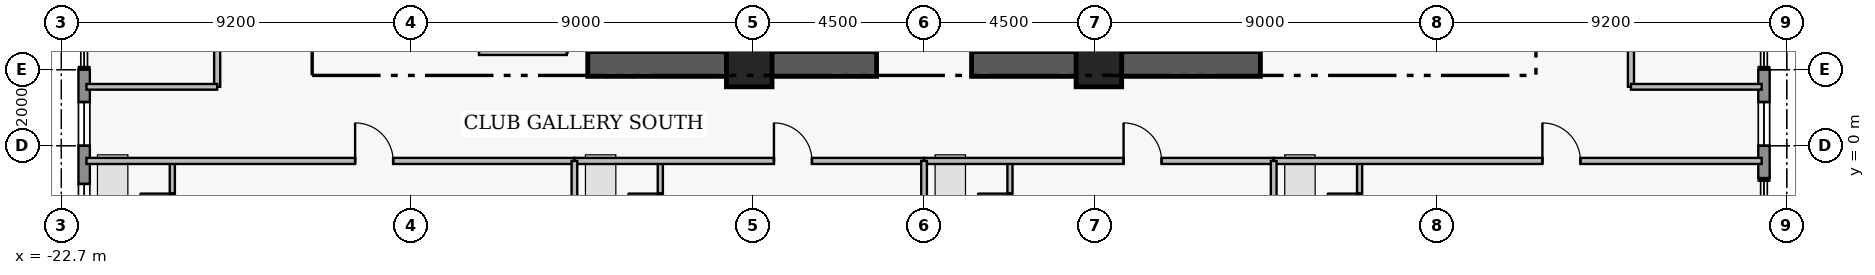
"""IFC4 building model, lengths in metres.
Left out: names, types, materials, properties, quantities, classifications, styles, units other than length and angle.
Written with IfcOpenShell. Run it as: python <this file> out.ifc"""

import sys

from ifc_helpers import new_model, si_unit, direction, frame, frame_2d, origin, origin_2d, place, context, subcontext, project, spatial, rectangle, extrude, element, fill, save


model = new_model("IFC4")
c1 = context("Model", 3, precision=1e-05, world=origin(), true_north=direction((0.0, 1.0)))
c2 = subcontext(c1, "Body", "Model", "MODEL_VIEW")
j1 = project(units=[si_unit("LENGTHUNIT", "METRE"), si_unit("PLANEANGLEUNIT", "RADIAN")], contexts=[c1])
p1 = place(None, origin())
s1 = spatial("IfcSite", under=j1, at=p1, CompositionType="ELEMENT")
p2 = place(p1, origin())
s2 = spatial("IfcBuilding", under=s1, at=p2, CompositionType="ELEMENT")
p3 = place(p2, frame((0.0, 0.0, 226.15)))
s3 = spatial("IfcBuildingStorey", under=s2, at=p3, CompositionType="ELEMENT", Elevation=226.15)
for number, where, z_axis, x_axis in (
    (1, (-8.85, 2.15, 0.0), (0.0, 0.0, 1.0), (1.0, 0.0, 0.0)),
    (2, (1.25, 2.15, 0.0), (0.0, 0.0, 1.0), (1.0, 0.0, 0.0)),
):
    element("IfcWall", number, at=place(p3, frame(where, z_axis=z_axis, x_axis=x_axis)), inside=s3, PredefinedType="SHEAR", context=c2, shape_type="SweptSolid", body=[
        extrude(rectangle(XDim=7.6, YDim=0.65, at=frame_2d((3.8, 0.0))), origin(), (0.0, 0.0, 1.0), 3.53),
    ])
for number, where, z_axis, x_axis in (
    (3, (-4.6, 2.15, 0.0), (0.0, 0.0, 1.0), (1.0, 0.0, 0.0)),
    (4, (4.6, 2.15, 0.0), (0.0, 0.0, 1.0), (1.0, 0.0, 0.0)),
):
    element("IfcColumn", number, at=place(p3, frame(where, z_axis=z_axis, x_axis=x_axis)), inside=s3, PredefinedType="COLUMN", context=c2, shape_type="SweptSolid", body=[
        extrude(rectangle(XDim=1.2, YDim=1.2, at=origin_2d()), origin(), (0.0, 0.0, 1.0), 3.75),
    ])
p4 = place(p3, frame((-22.1, -4.2, 0.0), z_axis=(0.0, 0.0, 1.0), x_axis=(0.0, 1.0, 0.0)))
e5 = element("IfcWall", 5, at=p4, inside=s3, PredefinedType="STANDARD", context=c2, shape_type="SweptSolid", body=[
    extrude(rectangle(XDim=6.2, YDim=0.3, at=frame_2d((3.1, 0.0))), origin(), (0.0, 0.0, 1.0), 3.53),
])
p5 = place(p4, frame((2.045, 0.0, 0.95)))
e6 = element("IfcOpeningElement", 6, at=p5, cuts=e5, PredefinedType="OPENING", context=c2, shape_type="SweptSolid", body=[
    extrude(rectangle(XDim=1.15, YDim=1.55, at=frame_2d((0.575, 0.775))), frame((0.0, 0.16, 0.0), z_axis=(0.0, -1.0, 0.0), x_axis=(1.0, 0.0, 0.0)), (0.0, 0.0, 1.0), 0.32),
])
p6 = place(p4, frame((4.2, 0.0, 0.95)))
e7 = element("IfcOpeningElement", 7, at=p6, cuts=e5, PredefinedType="OPENING", context=c2, shape_type="SweptSolid", body=[
    extrude(rectangle(XDim=1.15, YDim=1.55, at=frame_2d((0.575, 0.775))), frame((0.0, 0.16, 0.0), z_axis=(0.0, -1.0, 0.0), x_axis=(1.0, 0.0, 0.0)), (0.0, 0.0, 1.0), 0.32),
])
p7 = place(p3, frame((22.1, 2.0, 0.0), z_axis=(0.0, 0.0, 1.0), x_axis=(0.0, -1.0, 0.0)))
e8 = element("IfcWall", 8, at=p7, inside=s3, PredefinedType="STANDARD", context=c2, shape_type="SweptSolid", body=[
    extrude(rectangle(XDim=2.85, YDim=0.3, at=frame_2d((1.425, 0.0))), origin(), (0.0, 0.0, 1.0), 3.53),
])
p8 = place(p7, frame((0.85, 0.0, 0.95)))
e9 = element("IfcOpeningElement", 9, at=p8, cuts=e8, PredefinedType="OPENING", context=c2, shape_type="SweptSolid", body=[
    extrude(rectangle(XDim=1.15, YDim=1.55, at=frame_2d((0.575, 0.775))), frame((0.0, 0.16, 0.0), z_axis=(0.0, -1.0, 0.0), x_axis=(1.0, 0.0, 0.0)), (0.0, 0.0, 1.0), 0.32),
])
p9 = place(p3, frame((-19.78, -2.76, 0.0), z_axis=(0.0, 0.0, 1.0), x_axis=(0.0, 1.0, 0.0)))
e10 = element("IfcWall", 10, at=p9, inside=s3, PredefinedType="PLUMBINGWALL", context=c2, shape_type="SweptSolid", body=[
    extrude(rectangle(XDim=2.36, YDim=0.135, at=frame_2d((1.18, 0.0))), origin(), (0.0, 0.0, 1.0), 3.53),
])
p10 = place(p9, frame((0.65, 0.0, 0.0)))
e11 = element("IfcOpeningElement", 11, at=p10, cuts=e10, PredefinedType="OPENING", context=c2, shape_type="SweptSolid", body=[
    extrude(rectangle(XDim=0.85, YDim=2.1, at=frame_2d((0.425, 1.05))), frame((0.0, 0.077, 0.0), z_axis=(0.0, -1.0, 0.0), x_axis=(1.0, 0.0, 0.0)), (0.0, 0.0, 1.0), 0.155),
])
p11 = place(p3, frame((-22.04, -0.4, 0.0), z_axis=(0.0, 0.0, 1.0), x_axis=(1.0, 0.0, 0.0)))
e12 = element("IfcWall", 12, at=p11, inside=s3, PredefinedType="PARTITIONING", context=c2, shape_type="SweptSolid", body=[
    extrude(rectangle(XDim=12.84, YDim=0.16, at=frame_2d((6.42, 0.0))), origin(), (0.0, 0.0, 1.0), 3.53),
])
p12 = place(p11, frame((7.07, 0.0, 0.0)))
e13 = element("IfcOpeningElement", 13, at=p12, cuts=e12, PredefinedType="OPENING", context=c2, shape_type="SweptSolid", body=[
    extrude(rectangle(XDim=1.0, YDim=2.15, at=frame_2d((0.5, 1.075))), frame((0.0, 0.09, 0.0), z_axis=(0.0, -1.0, 0.0), x_axis=(1.0, 0.0, 0.0)), (0.0, 0.0, 1.0), 0.18),
])
p13 = place(p3, frame((-6.94, -2.76, 0.0), z_axis=(0.0, 0.0, 1.0), x_axis=(0.0, 1.0, 0.0)))
e14 = element("IfcWall", 14, at=p13, inside=s3, PredefinedType="PLUMBINGWALL", context=c2, shape_type="SweptSolid", body=[
    extrude(rectangle(XDim=2.36, YDim=0.135, at=frame_2d((1.18, 0.0))), origin(), (0.0, 0.0, 1.0), 3.53),
])
p14 = place(p13, frame((0.65, 0.0, 0.0)))
e15 = element("IfcOpeningElement", 15, at=p14, cuts=e14, PredefinedType="OPENING", context=c2, shape_type="SweptSolid", body=[
    extrude(rectangle(XDim=0.85, YDim=2.1, at=frame_2d((0.425, 1.05))), frame((0.0, 0.077, 0.0), z_axis=(0.0, -1.0, 0.0), x_axis=(1.0, 0.0, 0.0)), (0.0, 0.0, 1.0), 0.155),
])
p15 = place(p3, frame((-9.2, -0.4, 0.0), z_axis=(0.0, 0.0, 1.0), x_axis=(1.0, 0.0, 0.0)))
e16 = element("IfcWall", 16, at=p15, inside=s3, PredefinedType="PARTITIONING", context=c2, shape_type="SweptSolid", body=[
    extrude(rectangle(XDim=9.2, YDim=0.16, at=frame_2d((4.6, 0.0))), origin(), (0.0, 0.0, 1.0), 3.53),
])
p16 = place(p15, frame((5.25, 0.0, 0.0)))
e17 = element("IfcOpeningElement", 17, at=p16, cuts=e16, PredefinedType="OPENING", context=c2, shape_type="SweptSolid", body=[
    extrude(rectangle(XDim=1.0, YDim=2.15, at=frame_2d((0.5, 1.075))), frame((0.0, 0.09, 0.0), z_axis=(0.0, -1.0, 0.0), x_axis=(1.0, 0.0, 0.0)), (0.0, 0.0, 1.0), 0.18),
])
p17 = place(p3, frame((2.26, -2.76, 0.0), z_axis=(0.0, 0.0, 1.0), x_axis=(0.0, 1.0, 0.0)))
e18 = element("IfcWall", 18, at=p17, inside=s3, PredefinedType="PLUMBINGWALL", context=c2, shape_type="SweptSolid", body=[
    extrude(rectangle(XDim=2.36, YDim=0.135, at=frame_2d((1.18, 0.0))), origin(), (0.0, 0.0, 1.0), 3.53),
])
p18 = place(p17, frame((0.65, 0.0, 0.0)))
e19 = element("IfcOpeningElement", 19, at=p18, cuts=e18, PredefinedType="OPENING", context=c2, shape_type="SweptSolid", body=[
    extrude(rectangle(XDim=0.85, YDim=2.1, at=frame_2d((0.425, 1.05))), frame((0.0, 0.077, 0.0), z_axis=(0.0, -1.0, 0.0), x_axis=(1.0, 0.0, 0.0)), (0.0, 0.0, 1.0), 0.155),
])
p19 = place(p3, frame((0.0, -0.4, 0.0), z_axis=(0.0, 0.0, 1.0), x_axis=(1.0, 0.0, 0.0)))
e20 = element("IfcWall", 20, at=p19, inside=s3, PredefinedType="PARTITIONING", context=c2, shape_type="SweptSolid", body=[
    extrude(rectangle(XDim=9.2, YDim=0.16, at=frame_2d((4.6, 0.0))), origin(), (0.0, 0.0, 1.0), 3.53),
])
p20 = place(p19, frame((5.25, 0.0, 0.0)))
e21 = element("IfcOpeningElement", 21, at=p20, cuts=e20, PredefinedType="OPENING", context=c2, shape_type="SweptSolid", body=[
    extrude(rectangle(XDim=1.0, YDim=2.15, at=frame_2d((0.5, 1.075))), frame((0.0, 0.09, 0.0), z_axis=(0.0, -1.0, 0.0), x_axis=(1.0, 0.0, 0.0)), (0.0, 0.0, 1.0), 0.18),
])
p21 = place(p3, frame((11.46, -2.76, 0.0), z_axis=(0.0, 0.0, 1.0), x_axis=(0.0, 1.0, 0.0)))
e22 = element("IfcWall", 22, at=p21, inside=s3, PredefinedType="PLUMBINGWALL", context=c2, shape_type="SweptSolid", body=[
    extrude(rectangle(XDim=2.36, YDim=0.135, at=frame_2d((1.18, 0.0))), origin(), (0.0, 0.0, 1.0), 3.53),
])
p22 = place(p21, frame((0.65, 0.0, 0.0)))
e23 = element("IfcOpeningElement", 23, at=p22, cuts=e22, PredefinedType="OPENING", context=c2, shape_type="SweptSolid", body=[
    extrude(rectangle(XDim=0.85, YDim=2.1, at=frame_2d((0.425, 1.05))), frame((0.0, 0.077, 0.0), z_axis=(0.0, -1.0, 0.0), x_axis=(1.0, 0.0, 0.0)), (0.0, 0.0, 1.0), 0.155),
])
p23 = place(p3, frame((9.2, -0.4, 0.0), z_axis=(0.0, 0.0, 1.0), x_axis=(1.0, 0.0, 0.0)))
e24 = element("IfcWall", 24, at=p23, inside=s3, PredefinedType="PARTITIONING", context=c2, shape_type="SweptSolid", body=[
    extrude(rectangle(XDim=12.84, YDim=0.16, at=frame_2d((6.42, 0.0))), origin(), (0.0, 0.0, 1.0), 3.53),
])
p24 = place(p23, frame((7.07, 0.0, 0.0)))
e25 = element("IfcOpeningElement", 25, at=p24, cuts=e24, PredefinedType="OPENING", context=c2, shape_type="SweptSolid", body=[
    extrude(rectangle(XDim=1.0, YDim=2.15, at=frame_2d((0.5, 1.075))), frame((0.0, 0.09, 0.0), z_axis=(0.0, -1.0, 0.0), x_axis=(1.0, 0.0, 0.0)), (0.0, 0.0, 1.0), 0.18),
])
p25 = place(p3, frame((18.6, 1.55, 0.0), z_axis=(0.0, 0.0, 1.0), x_axis=(0.0, 1.0, 0.0)))
e26 = element("IfcWall", 26, at=p25, inside=s3, PredefinedType="PARTITIONING", context=c2, shape_type="SweptSolid", body=[
    extrude(rectangle(XDim=6.25, YDim=0.16, at=frame_2d((3.125, 0.0))), origin(), (0.0, 0.0, 1.0), 3.53),
])
p26 = place(p25, frame((2.665, 0.0, 0.0)))
e27 = element("IfcOpeningElement", 27, at=p26, cuts=e26, PredefinedType="OPENING", context=c2, shape_type="SweptSolid", body=[
    extrude(rectangle(XDim=0.92, YDim=2.12, at=frame_2d((0.46, 1.06))), frame((0.0, 0.09, 0.0), z_axis=(0.0, -1.0, 0.0), x_axis=(1.0, 0.0, 0.0)), (0.0, 0.0, 1.0), 0.18),
])
p27 = place(p3, frame((-18.6, 1.55, 0.0), z_axis=(0.0, 0.0, 1.0), x_axis=(0.0, 1.0, 0.0)))
e28 = element("IfcWall", 28, at=p27, inside=s3, PredefinedType="PARTITIONING", context=c2, shape_type="SweptSolid", body=[
    extrude(rectangle(XDim=5.2, YDim=0.16, at=frame_2d((2.6, 0.0))), origin(), (0.0, 0.0, 1.0), 3.53),
])
p28 = place(p27, frame((2.125, 0.0, 0.0)))
e29 = element("IfcOpeningElement", 29, at=p28, cuts=e28, PredefinedType="OPENING", context=c2, shape_type="SweptSolid", body=[
    extrude(rectangle(XDim=0.95, YDim=2.15, at=frame_2d((0.475, 1.075))), frame((0.0, 0.09, 0.0), z_axis=(0.0, -1.0, 0.0), x_axis=(1.0, 0.0, 0.0)), (0.0, 0.0, 1.0), 0.18),
])
p29 = place(p3, frame((-11.71, 2.47, 0.0), z_axis=(0.0, 0.0, 1.0), x_axis=(1.0, 0.0, 0.0)))
e30 = element("IfcWall", 30, at=p29, inside=s3, PredefinedType="PARTITIONING", context=c2, shape_type="SweptSolid", body=[
    extrude(rectangle(XDim=2.31, YDim=0.165, at=frame_2d((1.155, 0.0))), origin(), (0.0, 0.0, 1.0), 2.43),
])
for number, where, z_axis, x_axis in (
    (31, (-9.2, -7.52, 0.0), (0.0, 0.0, 1.0), (0.0, 1.0, 0.0)),
    (32, (0.0, -7.52, 0.0), (0.0, 0.0, 1.0), (0.0, 1.0, 0.0)),
    (33, (9.2, -7.52, 0.0), (0.0, 0.0, 1.0), (0.0, 1.0, 0.0)),
):
    element("IfcWall", number, at=place(p3, frame(where, z_axis=z_axis, x_axis=x_axis)), inside=s3, PredefinedType="PARTITIONING", context=c2, shape_type="SweptSolid", body=[
        extrude(rectangle(XDim=7.12, YDim=0.15, at=frame_2d((3.56, 0.0))), origin(), (0.0, 0.0, 1.0), 3.53),
    ])
for number, where, z_axis, x_axis in (
    (34, (18.6, 1.55, 0.0), (0.0, 0.0, 1.0), (1.0, 0.0, 0.0)),
    (35, (-22.04, 1.55, 0.0), (0.0, 0.0, 1.0), (1.0, 0.0, 0.0)),
):
    element("IfcWall", number, at=place(p3, frame(where, z_axis=z_axis, x_axis=x_axis)), inside=s3, PredefinedType="PARTITIONING", context=c2, shape_type="SweptSolid", body=[
        extrude(rectangle(XDim=3.44, YDim=0.15, at=frame_2d((1.72, 0.0))), origin(), (0.0, 0.0, 1.0), 3.53),
    ])
p30 = place(p5, origin())
e36 = element("IfcWindow", 36, at=p30, inside=s3, PartitioningType="SINGLE_PANEL", PredefinedType="WINDOW", context=c2, shape_type="SweptSolid", body=[
    extrude(rectangle(XDim=1.15, YDim=1.55, at=frame_2d((0.575, 0.775))), frame((0.0, 0.03, 0.0), z_axis=(0.0, -1.0, 0.0), x_axis=(1.0, 0.0, 0.0)), (0.0, 0.0, 1.0), 0.06),
])
fill(e6, e36)
p31 = place(p6, origin())
e37 = element("IfcWindow", 37, at=p31, inside=s3, PartitioningType="SINGLE_PANEL", PredefinedType="WINDOW", context=c2, shape_type="SweptSolid", body=[
    extrude(rectangle(XDim=1.15, YDim=1.55, at=frame_2d((0.575, 0.775))), frame((0.0, 0.03, 0.0), z_axis=(0.0, -1.0, 0.0), x_axis=(1.0, 0.0, 0.0)), (0.0, 0.0, 1.0), 0.06),
])
fill(e7, e37)
p32 = place(p8, origin())
e38 = element("IfcWindow", 38, at=p32, inside=s3, PartitioningType="SINGLE_PANEL", PredefinedType="WINDOW", context=c2, shape_type="SweptSolid", body=[
    extrude(rectangle(XDim=1.15, YDim=1.55, at=frame_2d((0.575, 0.775))), frame((0.0, 0.03, 0.0), z_axis=(0.0, -1.0, 0.0), x_axis=(1.0, 0.0, 0.0)), (0.0, 0.0, 1.0), 0.06),
])
fill(e9, e38)
p33 = place(p10, origin())
e39 = element("IfcDoor", 39, at=p33, inside=s3, OperationType="SINGLE_SWING_RIGHT", PredefinedType="DOOR", context=c2, shape_type="SweptSolid", body=[
    extrude(rectangle(XDim=0.85, YDim=2.1, at=frame_2d((0.425, 1.05))), frame((0.0, 0.025, 0.0), z_axis=(0.0, -1.0, 0.0), x_axis=(1.0, 0.0, 0.0)), (0.0, 0.0, 1.0), 0.05),
])
fill(e11, e39)
p34 = place(p12, origin())
e40 = element("IfcDoor", 40, at=p34, inside=s3, OperationType="SINGLE_SWING_LEFT", PredefinedType="DOOR", context=c2, shape_type="SweptSolid", body=[
    extrude(rectangle(XDim=1.0, YDim=2.15, at=frame_2d((0.5, 1.075))), frame((0.0, 0.025, 0.0), z_axis=(0.0, -1.0, 0.0), x_axis=(1.0, 0.0, 0.0)), (0.0, 0.0, 1.0), 0.05),
])
fill(e13, e40)
p35 = place(p14, origin())
e41 = element("IfcDoor", 41, at=p35, inside=s3, OperationType="SINGLE_SWING_RIGHT", PredefinedType="DOOR", context=c2, shape_type="SweptSolid", body=[
    extrude(rectangle(XDim=0.85, YDim=2.1, at=frame_2d((0.425, 1.05))), frame((0.0, 0.025, 0.0), z_axis=(0.0, -1.0, 0.0), x_axis=(1.0, 0.0, 0.0)), (0.0, 0.0, 1.0), 0.05),
])
fill(e15, e41)
p36 = place(p16, origin())
e42 = element("IfcDoor", 42, at=p36, inside=s3, OperationType="SINGLE_SWING_LEFT", PredefinedType="DOOR", context=c2, shape_type="SweptSolid", body=[
    extrude(rectangle(XDim=1.0, YDim=2.15, at=frame_2d((0.5, 1.075))), frame((0.0, 0.025, 0.0), z_axis=(0.0, -1.0, 0.0), x_axis=(1.0, 0.0, 0.0)), (0.0, 0.0, 1.0), 0.05),
])
fill(e17, e42)
p37 = place(p18, origin())
e43 = element("IfcDoor", 43, at=p37, inside=s3, OperationType="SINGLE_SWING_RIGHT", PredefinedType="DOOR", context=c2, shape_type="SweptSolid", body=[
    extrude(rectangle(XDim=0.85, YDim=2.1, at=frame_2d((0.425, 1.05))), frame((0.0, 0.025, 0.0), z_axis=(0.0, -1.0, 0.0), x_axis=(1.0, 0.0, 0.0)), (0.0, 0.0, 1.0), 0.05),
])
fill(e19, e43)
p38 = place(p20, origin())
e44 = element("IfcDoor", 44, at=p38, inside=s3, OperationType="SINGLE_SWING_LEFT", PredefinedType="DOOR", context=c2, shape_type="SweptSolid", body=[
    extrude(rectangle(XDim=1.0, YDim=2.15, at=frame_2d((0.5, 1.075))), frame((0.0, 0.025, 0.0), z_axis=(0.0, -1.0, 0.0), x_axis=(1.0, 0.0, 0.0)), (0.0, 0.0, 1.0), 0.05),
])
fill(e21, e44)
p39 = place(p22, origin())
e45 = element("IfcDoor", 45, at=p39, inside=s3, OperationType="SINGLE_SWING_RIGHT", PredefinedType="DOOR", context=c2, shape_type="SweptSolid", body=[
    extrude(rectangle(XDim=0.85, YDim=2.1, at=frame_2d((0.425, 1.05))), frame((0.0, 0.025, 0.0), z_axis=(0.0, -1.0, 0.0), x_axis=(1.0, 0.0, 0.0)), (0.0, 0.0, 1.0), 0.05),
])
fill(e23, e45)
p40 = place(p24, origin())
e46 = element("IfcDoor", 46, at=p40, inside=s3, OperationType="SINGLE_SWING_LEFT", PredefinedType="DOOR", context=c2, shape_type="SweptSolid", body=[
    extrude(rectangle(XDim=1.0, YDim=2.15, at=frame_2d((0.5, 1.075))), frame((0.0, 0.025, 0.0), z_axis=(0.0, -1.0, 0.0), x_axis=(1.0, 0.0, 0.0)), (0.0, 0.0, 1.0), 0.05),
])
fill(e25, e46)
save(model, sys.argv[1])
